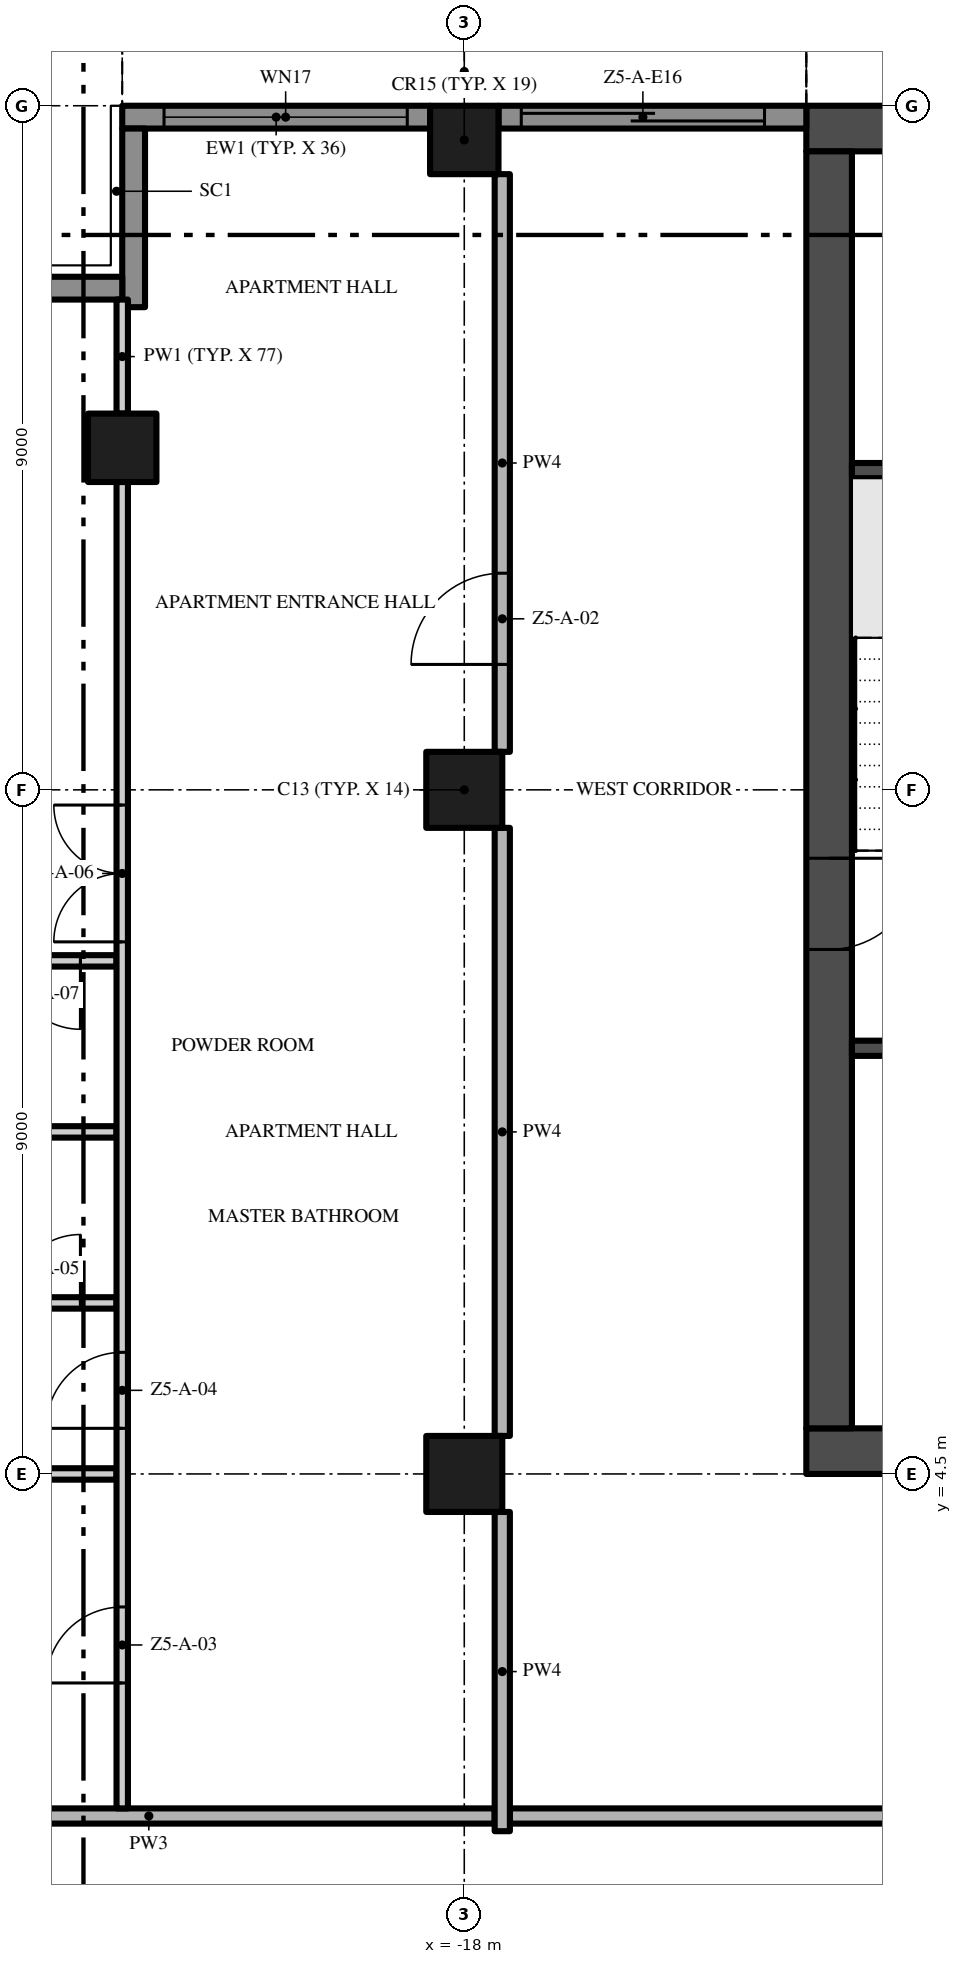
"""IFC4 building model, lengths in metres.
Left out: names, types, materials, properties, quantities, classifications, styles, units other than length and angle.
Written with IfcOpenShell. Run it as: python <this file> out.ifc"""

import sys

from ifc_helpers import new_model, si_unit, direction, frame, frame_2d, origin, origin_2d, place, context, subcontext, project, spatial, rectangle, extrude, element, fill, save


model = new_model("IFC4")
c1 = context("Model", 3, precision=1e-05, world=origin(), true_north=direction((0.0, 1.0)))
c2 = subcontext(c1, "Body", "Model", "MODEL_VIEW")
j1 = project(units=[si_unit("LENGTHUNIT", "METRE"), si_unit("PLANEANGLEUNIT", "RADIAN")], contexts=[c1])
p1 = place(None, origin())
s1 = spatial("IfcSite", under=j1, at=p1, CompositionType="ELEMENT")
p2 = place(p1, origin())
s2 = spatial("IfcBuilding", under=s1, at=p2, CompositionType="ELEMENT")
p3 = place(p2, frame((0.0, 0.0, 242.6)))
s3 = spatial("IfcBuildingStorey", under=s2, at=p3, CompositionType="ELEMENT", Elevation=242.6)
p4 = place(p3, frame((-13.5, 4.8, -0.3), z_axis=(0.0, 0.0, 1.0), x_axis=(1.0, 0.0, 0.0)))
e1 = element("IfcWall", 1, at=p4, inside=s3, PredefinedType="SHEAR", context=c2, shape_type="SweptSolid", body=[
    extrude(rectangle(XDim=27.0, YDim=0.6, at=frame_2d((13.5, 0.0))), origin(), (0.0, 0.0, 1.0), 3.8),
])
p5 = place(p4, frame((12.0, 0.0, 0.3)))
e2 = element("IfcOpeningElement", 2, at=p5, cuts=e1, PredefinedType="OPENING", context=c2, shape_type="SweptSolid", body=[
    extrude(rectangle(XDim=3.0, YDim=2.4, at=frame_2d((1.5, 1.2))), frame((0.0, 0.31, 0.0), z_axis=(0.0, -1.0, 0.0), x_axis=(1.0, 0.0, 0.0)), (0.0, 0.0, 1.0), 0.62),
])
p6 = place(p4, frame((4.9, 0.0, 0.3)))
e3 = element("IfcOpeningElement", 3, at=p6, cuts=e1, PredefinedType="OPENING", context=c2, shape_type="SweptSolid", body=[
    extrude(rectangle(XDim=1.2, YDim=2.2, at=frame_2d((0.6, 1.1))), frame((0.0, 0.31, 0.0), z_axis=(0.0, -1.0, 0.0), x_axis=(1.0, 0.0, 0.0)), (0.0, 0.0, 1.0), 0.62),
])
p7 = place(p4, frame((20.75, 0.0, 0.3)))
e4 = element("IfcOpeningElement", 4, at=p7, cuts=e1, PredefinedType="OPENING", context=c2, shape_type="SweptSolid", body=[
    extrude(rectangle(XDim=1.5, YDim=2.2, at=frame_2d((0.75, 1.1))), frame((0.0, 0.31, 0.0), z_axis=(0.0, -1.0, 0.0), x_axis=(1.0, 0.0, 0.0)), (0.0, 0.0, 1.0), 0.62),
])
p8 = place(p4, frame((17.4, 0.0, 0.3)))
e5 = element("IfcOpeningElement", 5, at=p8, cuts=e1, PredefinedType="OPENING", context=c2, shape_type="SweptSolid", body=[
    extrude(rectangle(XDim=1.2, YDim=2.2, at=frame_2d((0.6, 1.1))), frame((0.0, 0.31, 0.0), z_axis=(0.0, -1.0, 0.0), x_axis=(1.0, 0.0, 0.0)), (0.0, 0.0, 1.0), 0.62),
])
p9 = place(p3, frame((13.5, 22.2, -0.3), z_axis=(0.0, 0.0, 1.0), x_axis=(-1.0, 0.0, 0.0)))
e6 = element("IfcWall", 6, at=p9, inside=s3, PredefinedType="SHEAR", context=c2, shape_type="SweptSolid", body=[
    extrude(rectangle(XDim=27.0, YDim=0.6, at=frame_2d((13.5, 0.0))), origin(), (0.0, 0.0, 1.0), 3.8),
])
p10 = place(p3, frame((-13.2, 21.9, -0.3), z_axis=(0.0, 0.0, 1.0), x_axis=(0.0, -1.0, 0.0)))
e7 = element("IfcWall", 7, at=p10, inside=s3, PredefinedType="SHEAR", context=c2, shape_type="SweptSolid", body=[
    extrude(rectangle(XDim=16.8, YDim=0.6, at=frame_2d((8.4, 0.0))), origin(), (0.0, 0.0, 1.0), 3.8),
])
p11 = place(p10, frame((9.3, 0.0, 0.3)))
e8 = element("IfcOpeningElement", 8, at=p11, cuts=e7, PredefinedType="OPENING", context=c2, shape_type="SweptSolid", body=[
    extrude(rectangle(XDim=1.2, YDim=2.2, at=frame_2d((0.6, 1.1))), frame((0.0, 0.31, 0.0), z_axis=(0.0, -1.0, 0.0), x_axis=(1.0, 0.0, 0.0)), (0.0, 0.0, 1.0), 0.62),
])
p12 = place(p3, frame((-18.0, 13.5, 0.0), z_axis=(0.0, 0.0, 1.0), x_axis=(1.0, 0.0, 0.0)))
e9 = element("IfcColumn", 9, at=p12, inside=s3, PredefinedType="COLUMN", context=c2, shape_type="SweptSolid", body=[
    extrude(rectangle(XDim=1.0, YDim=1.0, at=origin_2d()), origin(), (0.0, 0.0, 1.0), 3.5),
])
p13 = place(p3, frame((-18.0, 22.05, 0.0), z_axis=(0.0, 0.0, 1.0), x_axis=(1.0, 0.0, 0.0)))
e10 = element("IfcColumn", 10, at=p13, inside=s3, PredefinedType="COLUMN", context=c2, shape_type="SweptSolid", body=[
    extrude(rectangle(XDim=0.9, YDim=0.9, at=origin_2d()), origin(), (0.0, 0.0, 1.0), 3.5),
])
p14 = place(p3, frame((-18.0, 4.5, 0.0), z_axis=(0.0, 0.0, 1.0), x_axis=(1.0, 0.0, 0.0)))
e11 = element("IfcColumn", 11, at=p14, inside=s3, PredefinedType="COLUMN", context=c2, shape_type="SweptSolid", body=[
    extrude(rectangle(XDim=1.0, YDim=1.0, at=origin_2d()), origin(), (0.0, 0.0, 1.0), 3.5),
])
p15 = place(p3, frame((-22.5, 18.0, 0.0), z_axis=(0.0, 0.0, 1.0), x_axis=(1.0, 0.0, 0.0)))
e12 = element("IfcColumn", 12, at=p15, inside=s3, PredefinedType="COLUMN", context=c2, shape_type="SweptSolid", body=[
    extrude(rectangle(XDim=0.9, YDim=0.9, at=origin_2d()), origin(), (0.0, 0.0, 1.0), 3.5),
])
p16 = place(p3, frame((-17.55, 22.35, 0.0), z_axis=(0.0, 0.0, 1.0), x_axis=(1.0, 0.0, 0.0)))
e13 = element("IfcWall", 13, at=p16, inside=s3, PredefinedType="SOLIDWALL", context=c2, shape_type="SweptSolid", body=[
    extrude(rectangle(XDim=4.05, YDim=0.3, at=frame_2d((2.025, 0.0))), origin(), (0.0, 0.0, 1.0), 3.5),
])
p17 = place(p16, frame((0.3, 0.0, 0.0)))
e14 = element("IfcOpeningElement", 14, at=p17, cuts=e13, PredefinedType="OPENING", context=c2, shape_type="SweptSolid", body=[
    extrude(rectangle(XDim=3.2, YDim=2.4, at=frame_2d((1.6, 1.2))), frame((0.0, 0.16, 0.0), z_axis=(0.0, -1.0, 0.0), x_axis=(1.0, 0.0, 0.0)), (0.0, 0.0, 1.0), 0.32),
])
p18 = place(p3, frame((-22.5, 22.35, 0.0), z_axis=(0.0, 0.0, 1.0), x_axis=(1.0, 0.0, 0.0)))
e15 = element("IfcWall", 15, at=p18, inside=s3, PredefinedType="SOLIDWALL", context=c2, shape_type="SweptSolid", body=[
    extrude(rectangle(XDim=4.05, YDim=0.3, at=frame_2d((2.025, 0.0))), origin(), (0.0, 0.0, 1.0), 3.5),
])
p19 = place(p18, frame((0.55, 0.0, 0.45)))
e16 = element("IfcOpeningElement", 16, at=p19, cuts=e15, PredefinedType="OPENING", context=c2, shape_type="SweptSolid", body=[
    extrude(rectangle(XDim=3.2, YDim=2.65, at=frame_2d((1.6, 1.325))), frame((0.0, 0.16, 0.0), z_axis=(0.0, -1.0, 0.0), x_axis=(1.0, 0.0, 0.0)), (0.0, 0.0, 1.0), 0.32),
])
p20 = place(p3, frame((-22.35, 19.85, 0.0), z_axis=(0.0, 0.0, 1.0), x_axis=(0.0, 1.0, 0.0)))
e17 = element("IfcWall", 17, at=p20, inside=s3, PredefinedType="SOLIDWALL", context=c2, shape_type="SweptSolid", body=[
    extrude(rectangle(XDim=2.35, YDim=0.3, at=frame_2d((1.175, 0.0))), origin(), (0.0, 0.0, 1.0), 3.5),
])
p21 = place(p3, frame((-24.75, 20.1, 0.0), z_axis=(0.0, 0.0, 1.0), x_axis=(1.0, 0.0, 0.0)))
e18 = element("IfcWall", 18, at=p21, inside=s3, PredefinedType="SOLIDWALL", context=c2, shape_type="SweptSolid", body=[
    extrude(rectangle(XDim=2.25, YDim=0.3, at=frame_2d((1.125, 0.0))), origin(), (0.0, 0.0, 1.0), 3.5),
])
for number, where, z_axis, x_axis in (
    (19, (-12.9, 10.1, 0.0), (0.0, 0.0, 1.0), (1.0, 0.0, 0.0)),
    (20, (-12.9, 17.7, 0.0), (0.0, 0.0, 1.0), (1.0, 0.0, 0.0)),
):
    element("IfcWall", number, at=place(p3, frame(where, z_axis=z_axis, x_axis=x_axis)), inside=s3, PredefinedType="SHEAR", context=c2, shape_type="SweptSolid", body=[
        extrude(rectangle(XDim=3.25, YDim=0.2, at=frame_2d((1.625, 0.0))), origin(), (0.0, 0.0, 1.0), 3.5),
    ])
p22 = place(p3, frame((17.4, 0.0, 0.0), z_axis=(0.0, 0.0, 1.0), x_axis=(-1.0, 0.0, 0.0)))
e21 = element("IfcWall", 21, at=p22, inside=s3, PredefinedType="PARTITIONING", context=c2, shape_type="SweptSolid", body=[
    extrude(rectangle(XDim=34.8, YDim=0.2, at=frame_2d((17.4, 0.0))), origin(), (0.0, 0.0, 1.0), 3.5),
])
p23 = place(p22, frame((25.65, 0.0, 0.0)))
e22 = element("IfcOpeningElement", 22, at=p23, cuts=e21, PredefinedType="OPENING", context=c2, shape_type="SweptSolid", body=[
    extrude(rectangle(XDim=1.5, YDim=2.4, at=frame_2d((0.75, 1.2))), frame((0.0, 0.11, 0.0), z_axis=(0.0, -1.0, 0.0), x_axis=(1.0, 0.0, 0.0)), (0.0, 0.0, 1.0), 0.22),
])
p24 = place(p22, frame((7.65, 0.0, 0.0)))
e23 = element("IfcOpeningElement", 23, at=p24, cuts=e21, PredefinedType="OPENING", context=c2, shape_type="SweptSolid", body=[
    extrude(rectangle(XDim=1.5, YDim=2.4, at=frame_2d((0.75, 1.2))), frame((0.0, 0.11, 0.0), z_axis=(0.0, -1.0, 0.0), x_axis=(1.0, 0.0, 0.0)), (0.0, 0.0, 1.0), 0.22),
])
p25 = place(p3, frame((-26.7, 0.0, 0.0), z_axis=(0.0, 0.0, 1.0), x_axis=(1.0, 0.0, 0.0)))
e24 = element("IfcWall", 24, at=p25, inside=s3, PredefinedType="PARTITIONING", context=c2, shape_type="SweptSolid", body=[
    extrude(rectangle(XDim=9.1, YDim=0.2, at=frame_2d((4.55, 0.0))), origin(), (0.0, 0.0, 1.0), 3.5),
])
p26 = place(p3, frame((-26.1, 4.5, 0.0), z_axis=(0.0, 0.0, 1.0), x_axis=(1.0, 0.0, 0.0)))
e25 = element("IfcWall", 25, at=p26, inside=s3, PredefinedType="PARTITIONING", context=c2, shape_type="SweptSolid", body=[
    extrude(rectangle(XDim=3.525, YDim=0.15, at=frame_2d((1.762, 0.0))), origin(), (0.0, 0.0, 1.0), 3.5),
])
p27 = place(p3, frame((-24.45, 6.75, 0.0), z_axis=(0.0, 0.0, 1.0), x_axis=(1.0, 0.0, 0.0)))
e26 = element("IfcWall", 26, at=p27, inside=s3, PredefinedType="PARTITIONING", context=c2, shape_type="SweptSolid", body=[
    extrude(rectangle(XDim=1.875, YDim=0.15, at=frame_2d((0.938, 0.0))), origin(), (0.0, 0.0, 1.0), 3.5),
])
p28 = place(p27, frame((0.5, 0.0, 0.0)))
e27 = element("IfcOpeningElement", 27, at=p28, cuts=e26, PredefinedType="OPENING", context=c2, shape_type="SweptSolid", body=[
    extrude(rectangle(XDim=0.9, YDim=2.1, at=frame_2d((0.45, 1.05))), frame((0.0, 0.085, 0.0), z_axis=(0.0, -1.0, 0.0), x_axis=(1.0, 0.0, 0.0)), (0.0, 0.0, 1.0), 0.17),
])
p29 = place(p3, frame((-24.45, 9.0, 0.0), z_axis=(0.0, 0.0, 1.0), x_axis=(1.0, 0.0, 0.0)))
e28 = element("IfcWall", 28, at=p29, inside=s3, PredefinedType="PARTITIONING", context=c2, shape_type="SweptSolid", body=[
    extrude(rectangle(XDim=1.875, YDim=0.15, at=frame_2d((0.938, 0.0))), origin(), (0.0, 0.0, 1.0), 3.5),
])
p30 = place(p3, frame((-22.575, 11.25, 0.0), z_axis=(0.0, 0.0, 1.0), x_axis=(-1.0, 0.0, 0.0)))
e29 = element("IfcWall", 29, at=p30, inside=s3, PredefinedType="PARTITIONING", context=c2, shape_type="SweptSolid", body=[
    extrude(rectangle(XDim=1.875, YDim=0.15, at=frame_2d((0.938, 0.0))), origin(), (0.0, 0.0, 1.0), 3.5),
])
p31 = place(p30, frame((0.475, 0.0, 0.0)))
e30 = element("IfcOpeningElement", 30, at=p31, cuts=e29, PredefinedType="OPENING", context=c2, shape_type="SweptSolid", body=[
    extrude(rectangle(XDim=0.9, YDim=2.1, at=frame_2d((0.45, 1.05))), frame((0.0, 0.085, 0.0), z_axis=(0.0, -1.0, 0.0), x_axis=(1.0, 0.0, 0.0)), (0.0, 0.0, 1.0), 0.17),
])
p32 = place(p3, frame((-22.5, 0.1, 0.0), z_axis=(0.0, 0.0, 1.0), x_axis=(0.0, 1.0, 0.0)))
e31 = element("IfcWall", 31, at=p32, inside=s3, PredefinedType="PARTITIONING", context=c2, shape_type="SweptSolid", body=[
    extrude(rectangle(XDim=17.45, YDim=0.15, at=frame_2d((8.725, 0.0))), origin(), (0.0, 0.0, 1.0), 3.5),
])
p33 = place(p32, frame((1.65, 0.0, 0.0)))
e32 = element("IfcOpeningElement", 32, at=p33, cuts=e31, PredefinedType="OPENING", context=c2, shape_type="SweptSolid", body=[
    extrude(rectangle(XDim=1.0, YDim=2.4, at=frame_2d((0.5, 1.2))), frame((0.0, 0.085, 0.0), z_axis=(0.0, -1.0, 0.0), x_axis=(1.0, 0.0, 0.0)), (0.0, 0.0, 1.0), 0.17),
])
p34 = place(p32, frame((5.0, 0.0, 0.0)))
e33 = element("IfcOpeningElement", 33, at=p34, cuts=e31, PredefinedType="OPENING", context=c2, shape_type="SweptSolid", body=[
    extrude(rectangle(XDim=1.0, YDim=2.4, at=frame_2d((0.5, 1.2))), frame((0.0, 0.085, 0.0), z_axis=(0.0, -1.0, 0.0), x_axis=(1.0, 0.0, 0.0)), (0.0, 0.0, 1.0), 0.17),
])
p35 = place(p32, frame((11.4, 0.0, 0.0)))
e34 = element("IfcOpeningElement", 34, at=p35, cuts=e31, PredefinedType="OPENING", context=c2, shape_type="SweptSolid", body=[
    extrude(rectangle(XDim=1.8, YDim=2.4, at=frame_2d((0.9, 1.2))), frame((0.0, 0.085, 0.0), z_axis=(0.0, -1.0, 0.0), x_axis=(1.0, 0.0, 0.0)), (0.0, 0.0, 1.0), 0.17),
])
p36 = place(p3, frame((-22.5, 18.45, 0.0), z_axis=(0.0, 0.0, 1.0), x_axis=(0.0, 1.0, 0.0)))
e35 = element("IfcWall", 35, at=p36, inside=s3, PredefinedType="PARTITIONING", context=c2, shape_type="SweptSolid", body=[
    extrude(rectangle(XDim=1.5, YDim=0.15, at=frame_2d((0.75, 0.0))), origin(), (0.0, 0.0, 1.0), 3.5),
])
p37 = place(p3, frame((-17.5, -0.2, 0.0), z_axis=(0.0, 0.0, 1.0), x_axis=(0.0, 1.0, 0.0)))
e36 = element("IfcWall", 36, at=p37, inside=s3, PredefinedType="PARTITIONING", context=c2, shape_type="SweptSolid", body=[
    extrude(rectangle(XDim=4.2, YDim=0.2, at=frame_2d((2.1, 0.0))), origin(), (0.0, 0.0, 1.0), 3.5),
])
p38 = place(p3, frame((-17.5, 5.0, 0.0), z_axis=(0.0, 0.0, 1.0), x_axis=(0.0, 1.0, 0.0)))
e37 = element("IfcWall", 37, at=p38, inside=s3, PredefinedType="PARTITIONING", context=c2, shape_type="SweptSolid", body=[
    extrude(rectangle(XDim=8.0, YDim=0.2, at=frame_2d((4.0, 0.0))), origin(), (0.0, 0.0, 1.0), 3.5),
])
p39 = place(p3, frame((-17.5, 14.0, 0.0), z_axis=(0.0, 0.0, 1.0), x_axis=(0.0, 1.0, 0.0)))
e38 = element("IfcWall", 38, at=p39, inside=s3, PredefinedType="PARTITIONING", context=c2, shape_type="SweptSolid", body=[
    extrude(rectangle(XDim=7.6, YDim=0.2, at=frame_2d((3.8, 0.0))), origin(), (0.0, 0.0, 1.0), 3.5),
])
p40 = place(p39, frame((1.15, 0.0, 0.0)))
e39 = element("IfcOpeningElement", 39, at=p40, cuts=e38, PredefinedType="OPENING", context=c2, shape_type="SweptSolid", body=[
    extrude(rectangle(XDim=1.2, YDim=2.4, at=frame_2d((0.6, 1.2))), frame((0.0, 0.11, 0.0), z_axis=(0.0, -1.0, 0.0), x_axis=(1.0, 0.0, 0.0)), (0.0, 0.0, 1.0), 0.22),
])
p41 = place(p17, origin())
e40 = element("IfcDoor", 40, at=p41, inside=s3, OperationType="SINGLE_SWING_LEFT", PredefinedType="DOOR", context=c2, shape_type="SweptSolid", body=[
    extrude(rectangle(XDim=3.2, YDim=2.4, at=frame_2d((1.6, 1.2))), frame((0.0, 0.025, 0.0), z_axis=(0.0, -1.0, 0.0), x_axis=(1.0, 0.0, 0.0)), (0.0, 0.0, 1.0), 0.05),
])
fill(e14, e40)
p42 = place(p19, origin())
e41 = element("IfcWindow", 41, at=p42, inside=s3, PartitioningType="SINGLE_PANEL", PredefinedType="WINDOW", context=c2, shape_type="SweptSolid", body=[
    extrude(rectangle(XDim=3.2, YDim=2.65, at=frame_2d((1.6, 1.325))), frame((0.0, 0.03, 0.0), z_axis=(0.0, -1.0, 0.0), x_axis=(1.0, 0.0, 0.0)), (0.0, 0.0, 1.0), 0.06),
])
fill(e16, e41)
p43 = place(p11, frame((1.2, 0.0, 0.0), z_axis=(0.0, 0.0, 1.0), x_axis=(-1.0, 0.0, 0.0)))
e42 = element("IfcDoor", 42, at=p43, inside=s3, OperationType="SINGLE_SWING_RIGHT", PredefinedType="DOOR", context=c2, shape_type="SweptSolid", body=[
    extrude(rectangle(XDim=1.2, YDim=2.2, at=frame_2d((0.6, 1.1))), frame((0.0, 0.025, 0.0), z_axis=(0.0, -1.0, 0.0), x_axis=(1.0, 0.0, 0.0)), (0.0, 0.0, 1.0), 0.05),
])
fill(e8, e42)
p44 = place(p40, origin())
e43 = element("IfcDoor", 43, at=p44, inside=s3, OperationType="SINGLE_SWING_LEFT", PredefinedType="DOOR", context=c2, shape_type="SweptSolid", body=[
    extrude(rectangle(XDim=1.2, YDim=2.4, at=frame_2d((0.6, 1.2))), frame((0.0, 0.025, 0.0), z_axis=(0.0, -1.0, 0.0), x_axis=(1.0, 0.0, 0.0)), (0.0, 0.0, 1.0), 0.05),
])
fill(e39, e43)
p45 = place(p33, origin())
e44 = element("IfcDoor", 44, at=p45, inside=s3, OperationType="SINGLE_SWING_LEFT", PredefinedType="DOOR", context=c2, shape_type="SweptSolid", body=[
    extrude(rectangle(XDim=1.0, YDim=2.4, at=frame_2d((0.5, 1.2))), frame((0.0, 0.025, 0.0), z_axis=(0.0, -1.0, 0.0), x_axis=(1.0, 0.0, 0.0)), (0.0, 0.0, 1.0), 0.05),
])
fill(e32, e44)
p46 = place(p34, origin())
e45 = element("IfcDoor", 45, at=p46, inside=s3, OperationType="SINGLE_SWING_LEFT", PredefinedType="DOOR", context=c2, shape_type="SweptSolid", body=[
    extrude(rectangle(XDim=1.0, YDim=2.4, at=frame_2d((0.5, 1.2))), frame((0.0, 0.025, 0.0), z_axis=(0.0, -1.0, 0.0), x_axis=(1.0, 0.0, 0.0)), (0.0, 0.0, 1.0), 0.05),
])
fill(e33, e45)
p47 = place(p28, origin())
e46 = element("IfcDoor", 46, at=p47, inside=s3, OperationType="SINGLE_SWING_RIGHT", PredefinedType="DOOR", context=c2, shape_type="SweptSolid", body=[
    extrude(rectangle(XDim=0.9, YDim=2.1, at=frame_2d((0.45, 1.05))), frame((0.0, 0.025, 0.0), z_axis=(0.0, -1.0, 0.0), x_axis=(1.0, 0.0, 0.0)), (0.0, 0.0, 1.0), 0.05),
])
fill(e27, e46)
p48 = place(p35, origin())
e47 = element("IfcDoor", 47, at=p48, inside=s3, OperationType="DOUBLE_DOOR_SINGLE_SWING", PredefinedType="DOOR", context=c2, shape_type="SweptSolid", body=[
    extrude(rectangle(XDim=1.8, YDim=2.4, at=frame_2d((0.9, 1.2))), frame((0.0, 0.025, 0.0), z_axis=(0.0, -1.0, 0.0), x_axis=(1.0, 0.0, 0.0)), (0.0, 0.0, 1.0), 0.05),
])
fill(e34, e47)
p49 = place(p31, origin())
e48 = element("IfcDoor", 48, at=p49, inside=s3, OperationType="SINGLE_SWING_LEFT", PredefinedType="DOOR", context=c2, shape_type="SweptSolid", body=[
    extrude(rectangle(XDim=0.9, YDim=2.1, at=frame_2d((0.45, 1.05))), frame((0.0, 0.025, 0.0), z_axis=(0.0, -1.0, 0.0), x_axis=(1.0, 0.0, 0.0)), (0.0, 0.0, 1.0), 0.05),
])
fill(e30, e48)
save(model, sys.argv[1])
